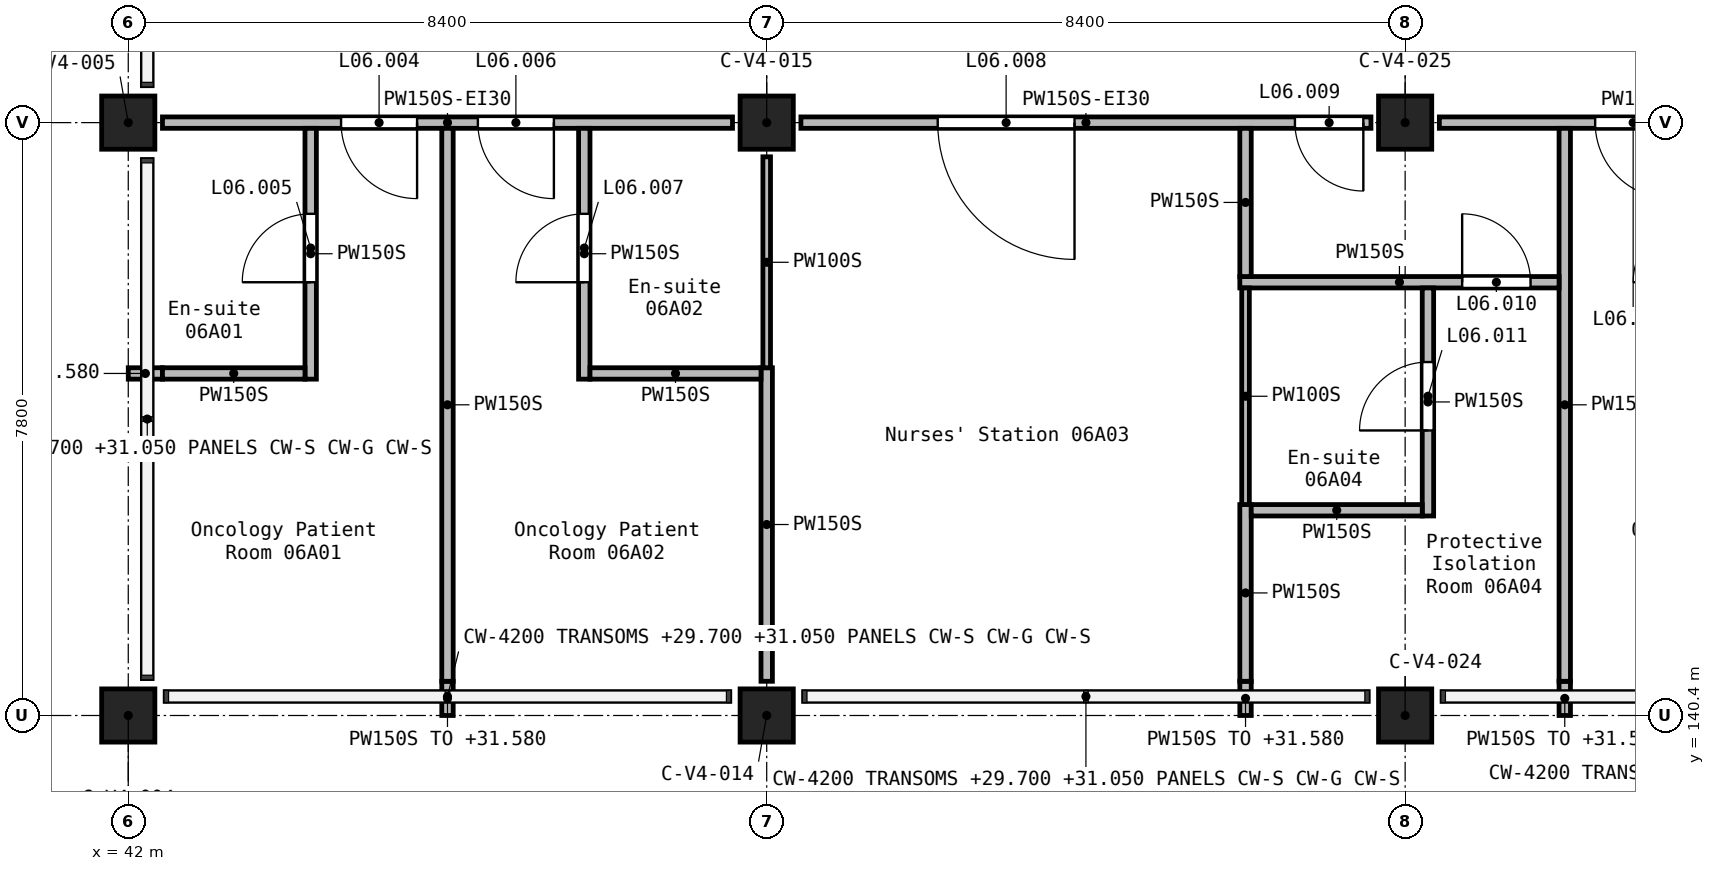
"""IFC4 building model, lengths in metres.
Left out: names, types, materials, properties, quantities, classifications, styles, units other than length and angle.
Written with IfcOpenShell. Run it as: python <this file> out.ifc"""

import sys

from ifc_helpers import new_model, si_unit, direction, frame, frame_2d, origin, origin_2d, place, context, subcontext, project, spatial, rectangle, extrude, element, fill, save


model = new_model("IFC4")
c1 = context("Model", 3, precision=1e-05, world=origin(), true_north=direction((0.0, 1.0)))
c2 = subcontext(c1, "Body", "Model", "MODEL_VIEW")
j1 = project(units=[si_unit("LENGTHUNIT", "METRE"), si_unit("PLANEANGLEUNIT", "RADIAN")], contexts=[c1])
p1 = place(None, origin())
s1 = spatial("IfcSite", under=j1, at=p1, CompositionType="ELEMENT")
p2 = place(p1, origin())
s2 = spatial("IfcBuilding", under=s1, at=p2, CompositionType="ELEMENT")
p3 = place(p2, frame((0.0, 0.0, 28.8)))
s3 = spatial("IfcBuildingStorey", under=s2, at=p3, CompositionType="ELEMENT", Elevation=28.8)
for number, where, z_axis, x_axis in (
    (1, (42.0, 140.4, 0.0), (0.0, 0.0, 1.0), (1.0, 0.0, 0.0)),
    (2, (42.0, 148.2, 0.0), (0.0, 0.0, 1.0), (1.0, 0.0, 0.0)),
    (3, (50.4, 140.4, 0.0), (0.0, 0.0, 1.0), (1.0, 0.0, 0.0)),
    (4, (50.4, 148.2, 0.0), (0.0, 0.0, 1.0), (1.0, 0.0, 0.0)),
    (5, (58.8, 140.4, 0.0), (0.0, 0.0, 1.0), (1.0, 0.0, 0.0)),
    (6, (58.8, 148.2, 0.0), (0.0, 0.0, 1.0), (1.0, 0.0, 0.0)),
):
    element("IfcColumn", number, at=place(p3, frame(where, z_axis=z_axis, x_axis=x_axis)), inside=s3, PredefinedType="COLUMN", context=c2, shape_type="SweptSolid", body=[
        extrude(rectangle(XDim=0.7, YDim=0.7, at=origin_2d()), origin(), (0.0, 0.0, 1.0), 3.9),
    ])
p4 = place(p3, frame((65.175, 148.2, 0.0), z_axis=(0.0, 0.0, 1.0), x_axis=(-1.0, 0.0, 0.0)))
e7 = element("IfcWall", 7, at=p4, inside=s3, PredefinedType="PARTITIONING", context=c2, shape_type="SweptSolid", body=[
    extrude(rectangle(XDim=5.925, YDim=0.15, at=frame_2d((2.962, 0.0))), origin(), (0.0, 0.0, 1.0), 3.6),
])
p5 = place(p4, frame((2.875, 0.0, 0.0)))
e8 = element("IfcOpeningElement", 8, at=p5, cuts=e7, PredefinedType="OPENING", context=c2, shape_type="SweptSolid", body=[
    extrude(rectangle(XDim=1.0, YDim=2.1, at=frame_2d((0.5, 1.05))), frame((0.0, 0.085, 0.0), z_axis=(0.0, -1.0, 0.0), x_axis=(1.0, 0.0, 0.0)), (0.0, 0.0, 1.0), 0.17),
])
p6 = place(p3, frame((58.35, 148.2, 0.0), z_axis=(0.0, 0.0, 1.0), x_axis=(-1.0, 0.0, 0.0)))
e9 = element("IfcWall", 9, at=p6, inside=s3, PredefinedType="PARTITIONING", context=c2, shape_type="SweptSolid", body=[
    extrude(rectangle(XDim=7.5, YDim=0.15, at=frame_2d((3.75, 0.0))), origin(), (0.0, 0.0, 1.0), 3.6),
])
p7 = place(p6, frame((3.9, 0.0, 0.0)))
e10 = element("IfcOpeningElement", 10, at=p7, cuts=e9, PredefinedType="OPENING", context=c2, shape_type="SweptSolid", body=[
    extrude(rectangle(XDim=1.8, YDim=2.1, at=frame_2d((0.9, 1.05))), frame((0.0, 0.085, 0.0), z_axis=(0.0, -1.0, 0.0), x_axis=(1.0, 0.0, 0.0)), (0.0, 0.0, 1.0), 0.17),
])
p8 = place(p6, frame((0.1, 0.0, 0.0)))
e11 = element("IfcOpeningElement", 11, at=p8, cuts=e9, PredefinedType="OPENING", context=c2, shape_type="SweptSolid", body=[
    extrude(rectangle(XDim=0.9, YDim=2.1, at=frame_2d((0.45, 1.05))), frame((0.0, 0.085, 0.0), z_axis=(0.0, -1.0, 0.0), x_axis=(1.0, 0.0, 0.0)), (0.0, 0.0, 1.0), 0.17),
])
p9 = place(p3, frame((49.95, 148.2, 0.0), z_axis=(0.0, 0.0, 1.0), x_axis=(-1.0, 0.0, 0.0)))
e12 = element("IfcWall", 12, at=p9, inside=s3, PredefinedType="PARTITIONING", context=c2, shape_type="SweptSolid", body=[
    extrude(rectangle(XDim=7.5, YDim=0.15, at=frame_2d((3.75, 0.0))), origin(), (0.0, 0.0, 1.0), 3.6),
])
p10 = place(p9, frame((4.15, 0.0, 0.0)))
e13 = element("IfcOpeningElement", 13, at=p10, cuts=e12, PredefinedType="OPENING", context=c2, shape_type="SweptSolid", body=[
    extrude(rectangle(XDim=1.0, YDim=2.1, at=frame_2d((0.5, 1.05))), frame((0.0, 0.085, 0.0), z_axis=(0.0, -1.0, 0.0), x_axis=(1.0, 0.0, 0.0)), (0.0, 0.0, 1.0), 0.17),
])
p11 = place(p9, frame((2.35, 0.0, 0.0)))
e14 = element("IfcOpeningElement", 14, at=p11, cuts=e12, PredefinedType="OPENING", context=c2, shape_type="SweptSolid", body=[
    extrude(rectangle(XDim=1.0, YDim=2.1, at=frame_2d((0.5, 1.05))), frame((0.0, 0.085, 0.0), z_axis=(0.0, -1.0, 0.0), x_axis=(1.0, 0.0, 0.0)), (0.0, 0.0, 1.0), 0.17),
])
p12 = place(p3, frame((46.2, 140.4, 0.0), z_axis=(0.0, 0.0, 1.0), x_axis=(0.0, 1.0, 0.0)))
e15 = element("IfcWall", 15, at=p12, inside=s3, PredefinedType="PARTITIONING", context=c2, shape_type="SweptSolid", body=[
    extrude(rectangle(XDim=0.45, YDim=0.15, at=frame_2d((0.225, 0.0))), origin(), (0.0, 0.0, 1.0), 2.78),
])
p13 = place(p3, frame((46.2, 140.85, 0.0), z_axis=(0.0, 0.0, 1.0), x_axis=(0.0, 1.0, 0.0)))
e16 = element("IfcWall", 16, at=p13, inside=s3, PredefinedType="PARTITIONING", context=c2, shape_type="SweptSolid", body=[
    extrude(rectangle(XDim=7.275, YDim=0.15, at=frame_2d((3.637, 0.0))), origin(), (0.0, 0.0, 1.0), 3.6),
])
p14 = place(p3, frame((60.9, 140.4, 0.0), z_axis=(0.0, 0.0, 1.0), x_axis=(0.0, 1.0, 0.0)))
e17 = element("IfcWall", 17, at=p14, inside=s3, PredefinedType="PARTITIONING", context=c2, shape_type="SweptSolid", body=[
    extrude(rectangle(XDim=0.45, YDim=0.15, at=frame_2d((0.225, 0.0))), origin(), (0.0, 0.0, 1.0), 2.78),
])
p15 = place(p3, frame((60.9, 140.85, 0.0), z_axis=(0.0, 0.0, 1.0), x_axis=(0.0, 1.0, 0.0)))
e18 = element("IfcWall", 18, at=p15, inside=s3, PredefinedType="PARTITIONING", context=c2, shape_type="SweptSolid", body=[
    extrude(rectangle(XDim=7.275, YDim=0.15, at=frame_2d((3.637, 0.0))), origin(), (0.0, 0.0, 1.0), 3.6),
])
p16 = place(p3, frame((50.4, 140.85, 0.0), z_axis=(0.0, 0.0, 1.0), x_axis=(0.0, 1.0, 0.0)))
e19 = element("IfcWall", 19, at=p16, inside=s3, PredefinedType="PARTITIONING", context=c2, shape_type="SweptSolid", body=[
    extrude(rectangle(XDim=4.125, YDim=0.15, at=frame_2d((2.062, 0.0))), origin(), (0.0, 0.0, 1.0), 3.6),
])
p17 = place(p3, frame((56.625, 146.1, 0.0), z_axis=(0.0, 0.0, 1.0), x_axis=(1.0, 0.0, 0.0)))
e20 = element("IfcWall", 20, at=p17, inside=s3, PredefinedType="PARTITIONING", context=c2, shape_type="SweptSolid", body=[
    extrude(rectangle(XDim=4.2, YDim=0.15, at=frame_2d((2.1, 0.0))), origin(), (0.0, 0.0, 1.0), 3.6),
])
p18 = place(p17, frame((2.925, 0.0, 0.0)))
e21 = element("IfcOpeningElement", 21, at=p18, cuts=e20, PredefinedType="OPENING", context=c2, shape_type="SweptSolid", body=[
    extrude(rectangle(XDim=0.9, YDim=2.1, at=frame_2d((0.45, 1.05))), frame((0.0, 0.085, 0.0), z_axis=(0.0, -1.0, 0.0), x_axis=(1.0, 0.0, 0.0)), (0.0, 0.0, 1.0), 0.17),
])
p19 = place(p3, frame((44.4, 144.825, 0.0), z_axis=(0.0, 0.0, 1.0), x_axis=(0.0, 1.0, 0.0)))
e22 = element("IfcWall", 22, at=p19, inside=s3, PredefinedType="PARTITIONING", context=c2, shape_type="SweptSolid", body=[
    extrude(rectangle(XDim=3.3, YDim=0.15, at=frame_2d((1.65, 0.0))), origin(), (0.0, 0.0, 1.0), 3.6),
])
p20 = place(p19, frame((1.275, 0.0, 0.0)))
e23 = element("IfcOpeningElement", 23, at=p20, cuts=e22, PredefinedType="OPENING", context=c2, shape_type="SweptSolid", body=[
    extrude(rectangle(XDim=0.9, YDim=2.1, at=frame_2d((0.45, 1.05))), frame((0.0, 0.085, 0.0), z_axis=(0.0, -1.0, 0.0), x_axis=(1.0, 0.0, 0.0)), (0.0, 0.0, 1.0), 0.17),
])
p21 = place(p3, frame((48.0, 144.825, 0.0), z_axis=(0.0, 0.0, 1.0), x_axis=(0.0, 1.0, 0.0)))
e24 = element("IfcWall", 24, at=p21, inside=s3, PredefinedType="PARTITIONING", context=c2, shape_type="SweptSolid", body=[
    extrude(rectangle(XDim=3.3, YDim=0.15, at=frame_2d((1.65, 0.0))), origin(), (0.0, 0.0, 1.0), 3.6),
])
p22 = place(p21, frame((1.275, 0.0, 0.0)))
e25 = element("IfcOpeningElement", 25, at=p22, cuts=e24, PredefinedType="OPENING", context=c2, shape_type="SweptSolid", body=[
    extrude(rectangle(XDim=0.9, YDim=2.1, at=frame_2d((0.45, 1.05))), frame((0.0, 0.085, 0.0), z_axis=(0.0, -1.0, 0.0), x_axis=(1.0, 0.0, 0.0)), (0.0, 0.0, 1.0), 0.17),
])
p23 = place(p3, frame((59.1, 143.025, 0.0), z_axis=(0.0, 0.0, 1.0), x_axis=(0.0, 1.0, 0.0)))
e26 = element("IfcWall", 26, at=p23, inside=s3, PredefinedType="PARTITIONING", context=c2, shape_type="SweptSolid", body=[
    extrude(rectangle(XDim=3.0, YDim=0.15, at=frame_2d((1.5, 0.0))), origin(), (0.0, 0.0, 1.0), 3.6),
])
p24 = place(p23, frame((1.125, 0.0, 0.0)))
e27 = element("IfcOpeningElement", 27, at=p24, cuts=e26, PredefinedType="OPENING", context=c2, shape_type="SweptSolid", body=[
    extrude(rectangle(XDim=0.9, YDim=2.1, at=frame_2d((0.45, 1.05))), frame((0.0, 0.085, 0.0), z_axis=(0.0, -1.0, 0.0), x_axis=(1.0, 0.0, 0.0)), (0.0, 0.0, 1.0), 0.17),
])
p25 = place(p3, frame((56.7, 140.4, 0.0), z_axis=(0.0, 0.0, 1.0), x_axis=(0.0, 1.0, 0.0)))
e28 = element("IfcWall", 28, at=p25, inside=s3, PredefinedType="PARTITIONING", context=c2, shape_type="SweptSolid", body=[
    extrude(rectangle(XDim=0.45, YDim=0.15, at=frame_2d((0.225, 0.0))), origin(), (0.0, 0.0, 1.0), 2.78),
])
p26 = place(p3, frame((56.7, 140.85, 0.0), z_axis=(0.0, 0.0, 1.0), x_axis=(0.0, 1.0, 0.0)))
e29 = element("IfcWall", 29, at=p26, inside=s3, PredefinedType="PARTITIONING", context=c2, shape_type="SweptSolid", body=[
    extrude(rectangle(XDim=2.325, YDim=0.15, at=frame_2d((1.163, 0.0))), origin(), (0.0, 0.0, 1.0), 3.6),
])
p27 = place(p3, frame((42.0, 144.9, 0.0), z_axis=(0.0, 0.0, 1.0), x_axis=(1.0, 0.0, 0.0)))
e30 = element("IfcWall", 30, at=p27, inside=s3, PredefinedType="PARTITIONING", context=c2, shape_type="SweptSolid", body=[
    extrude(rectangle(XDim=0.45, YDim=0.15, at=frame_2d((0.225, 0.0))), origin(), (0.0, 0.0, 1.0), 2.78),
])
p28 = place(p3, frame((42.45, 144.9, 0.0), z_axis=(0.0, 0.0, 1.0), x_axis=(1.0, 0.0, 0.0)))
e31 = element("IfcWall", 31, at=p28, inside=s3, PredefinedType="PARTITIONING", context=c2, shape_type="SweptSolid", body=[
    extrude(rectangle(XDim=1.875, YDim=0.15, at=frame_2d((0.938, 0.0))), origin(), (0.0, 0.0, 1.0), 3.6),
])
for number, where, z_axis, x_axis in (
    (32, (48.075, 144.9, 0.0), (0.0, 0.0, 1.0), (1.0, 0.0, 0.0)),
    (33, (56.775, 143.1, 0.0), (0.0, 0.0, 1.0), (1.0, 0.0, 0.0)),
):
    element("IfcWall", number, at=place(p3, frame(where, z_axis=z_axis, x_axis=x_axis)), inside=s3, PredefinedType="PARTITIONING", context=c2, shape_type="SweptSolid", body=[
        extrude(rectangle(XDim=2.25, YDim=0.15, at=frame_2d((1.125, 0.0))), origin(), (0.0, 0.0, 1.0), 3.6),
    ])
p29 = place(p3, frame((56.7, 146.175, 0.0), z_axis=(0.0, 0.0, 1.0), x_axis=(0.0, 1.0, 0.0)))
e34 = element("IfcWall", 34, at=p29, inside=s3, PredefinedType="PARTITIONING", context=c2, shape_type="SweptSolid", body=[
    extrude(rectangle(XDim=1.95, YDim=0.15, at=frame_2d((0.975, 0.0))), origin(), (0.0, 0.0, 1.0), 3.6),
])
p30 = place(p3, frame((50.4, 144.975, 0.0), z_axis=(0.0, 0.0, 1.0), x_axis=(0.0, 1.0, 0.0)))
e35 = element("IfcWall", 35, at=p30, inside=s3, PredefinedType="PARTITIONING", context=c2, shape_type="SweptSolid", body=[
    extrude(rectangle(XDim=2.775, YDim=0.1, at=frame_2d((1.387, 0.0))), origin(), (0.0, 0.0, 1.0), 3.6),
])
p31 = place(p3, frame((56.7, 143.175, 0.0), z_axis=(0.0, 0.0, 1.0), x_axis=(0.0, 1.0, 0.0)))
e36 = element("IfcWall", 36, at=p31, inside=s3, PredefinedType="PARTITIONING", context=c2, shape_type="SweptSolid", body=[
    extrude(rectangle(XDim=2.85, YDim=0.1, at=frame_2d((1.425, 0.0))), origin(), (0.0, 0.0, 1.0), 3.6),
])
p32 = place(p10, origin())
e37 = element("IfcDoor", 37, at=p32, inside=s3, OperationType="SINGLE_SWING_RIGHT", PredefinedType="DOOR", context=c2, shape_type="SweptSolid", body=[
    extrude(rectangle(XDim=1.0, YDim=2.1, at=frame_2d((0.5, 1.05))), frame((0.0, 0.025, 0.0), z_axis=(0.0, -1.0, 0.0), x_axis=(1.0, 0.0, 0.0)), (0.0, 0.0, 1.0), 0.05),
])
fill(e13, e37)
p33 = place(p20, origin())
e38 = element("IfcDoor", 38, at=p33, inside=s3, OperationType="SINGLE_SWING_RIGHT", PredefinedType="DOOR", context=c2, shape_type="SweptSolid", body=[
    extrude(rectangle(XDim=0.9, YDim=2.1, at=frame_2d((0.45, 1.05))), frame((0.0, 0.025, 0.0), z_axis=(0.0, -1.0, 0.0), x_axis=(1.0, 0.0, 0.0)), (0.0, 0.0, 1.0), 0.05),
])
fill(e23, e38)
p34 = place(p11, origin())
e39 = element("IfcDoor", 39, at=p34, inside=s3, OperationType="SINGLE_SWING_LEFT", PredefinedType="DOOR", context=c2, shape_type="SweptSolid", body=[
    extrude(rectangle(XDim=1.0, YDim=2.1, at=frame_2d((0.5, 1.05))), frame((0.0, 0.025, 0.0), z_axis=(0.0, -1.0, 0.0), x_axis=(1.0, 0.0, 0.0)), (0.0, 0.0, 1.0), 0.05),
])
fill(e14, e39)
p35 = place(p22, frame((0.9, 0.0, 0.0), z_axis=(0.0, 0.0, 1.0), x_axis=(-1.0, 0.0, 0.0)))
e40 = element("IfcDoor", 40, at=p35, inside=s3, OperationType="SINGLE_SWING_LEFT", PredefinedType="DOOR", context=c2, shape_type="SweptSolid", body=[
    extrude(rectangle(XDim=0.9, YDim=2.1, at=frame_2d((0.45, 1.05))), frame((0.0, 0.025, 0.0), z_axis=(0.0, -1.0, 0.0), x_axis=(1.0, 0.0, 0.0)), (0.0, 0.0, 1.0), 0.05),
])
fill(e25, e40)
p36 = place(p7, origin())
e41 = element("IfcDoor", 41, at=p36, inside=s3, OperationType="DOUBLE_DOOR_SINGLE_SWING", PredefinedType="DOOR", context=c2, shape_type="SweptSolid", body=[
    extrude(rectangle(XDim=1.8, YDim=2.1, at=frame_2d((0.9, 1.05))), frame((0.0, 0.025, 0.0), z_axis=(0.0, -1.0, 0.0), x_axis=(1.0, 0.0, 0.0)), (0.0, 0.0, 1.0), 0.05),
])
fill(e10, e41)
p37 = place(p8, origin())
e42 = element("IfcDoor", 42, at=p37, inside=s3, OperationType="SINGLE_SWING_LEFT", PredefinedType="DOOR", context=c2, shape_type="SweptSolid", body=[
    extrude(rectangle(XDim=0.9, YDim=2.1, at=frame_2d((0.45, 1.05))), frame((0.0, 0.025, 0.0), z_axis=(0.0, -1.0, 0.0), x_axis=(1.0, 0.0, 0.0)), (0.0, 0.0, 1.0), 0.05),
])
fill(e11, e42)
p38 = place(p18, frame((0.9, 0.0, 0.0), z_axis=(0.0, 0.0, 1.0), x_axis=(-1.0, 0.0, 0.0)))
e43 = element("IfcDoor", 43, at=p38, inside=s3, OperationType="SINGLE_SWING_LEFT", PredefinedType="DOOR", context=c2, shape_type="SweptSolid", body=[
    extrude(rectangle(XDim=0.9, YDim=2.1, at=frame_2d((0.45, 1.05))), frame((0.0, 0.025, 0.0), z_axis=(0.0, -1.0, 0.0), x_axis=(1.0, 0.0, 0.0)), (0.0, 0.0, 1.0), 0.05),
])
fill(e21, e43)
p39 = place(p24, origin())
e44 = element("IfcDoor", 44, at=p39, inside=s3, OperationType="SINGLE_SWING_RIGHT", PredefinedType="DOOR", context=c2, shape_type="SweptSolid", body=[
    extrude(rectangle(XDim=0.9, YDim=2.1, at=frame_2d((0.45, 1.05))), frame((0.0, 0.025, 0.0), z_axis=(0.0, -1.0, 0.0), x_axis=(1.0, 0.0, 0.0)), (0.0, 0.0, 1.0), 0.05),
])
fill(e27, e44)
p40 = place(p5, origin())
e45 = element("IfcDoor", 45, at=p40, inside=s3, OperationType="SINGLE_SWING_RIGHT", PredefinedType="DOOR", context=c2, shape_type="SweptSolid", body=[
    extrude(rectangle(XDim=1.0, YDim=2.1, at=frame_2d((0.5, 1.05))), frame((0.0, 0.025, 0.0), z_axis=(0.0, -1.0, 0.0), x_axis=(1.0, 0.0, 0.0)), (0.0, 0.0, 1.0), 0.05),
])
fill(e8, e45)
save(model, sys.argv[1])
